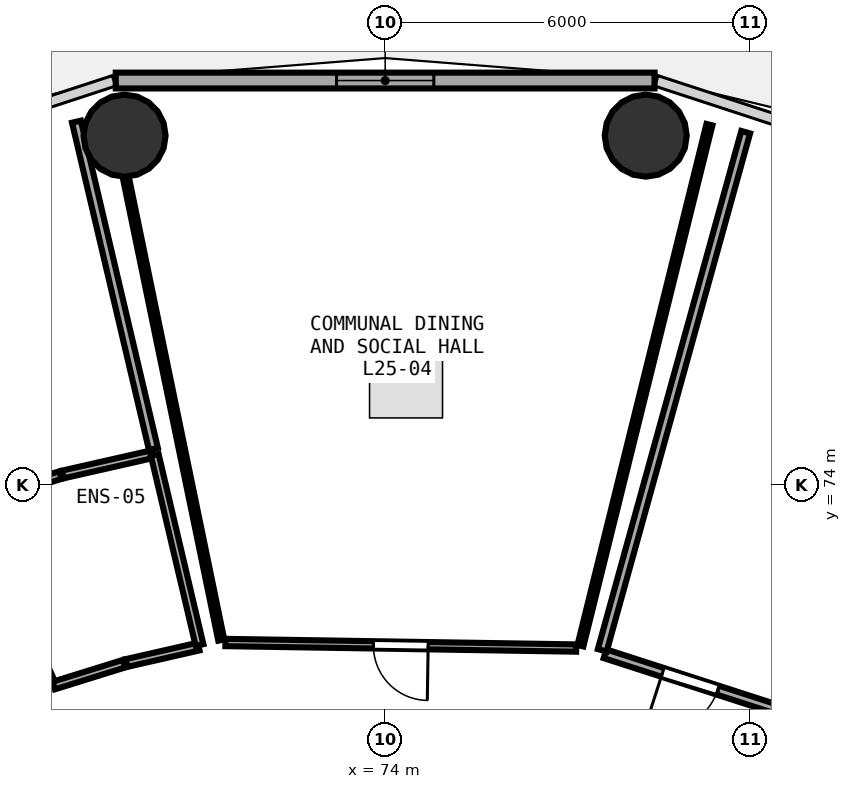
"""IFC4 building model, lengths in metres.
Left out: names, types, materials, properties, quantities, classifications, styles, units other than length and angle.
Written with IfcOpenShell. Run it as: python <this file> out.ifc"""

import sys

from ifc_helpers import new_model, si_unit, direction, frame, frame_2d, origin, origin_2d, place, context, subcontext, project, spatial, rectangle, circle, extrude, element, fill, save


model = new_model("IFC4")
c1 = context("Model", 3, precision=1e-05, world=origin(), true_north=direction((0.0, 1.0)))
c2 = subcontext(c1, "Body", "Model", "MODEL_VIEW")
j1 = project(units=[si_unit("LENGTHUNIT", "METRE"), si_unit("PLANEANGLEUNIT", "RADIAN")], contexts=[c1])
p1 = place(None, origin())
s1 = spatial("IfcSite", under=j1, at=p1, CompositionType="ELEMENT")
p2 = place(p1, origin())
s2 = spatial("IfcBuilding", under=s1, at=p2, CompositionType="ELEMENT")
p3 = place(p2, frame((0.0, 0.0, 98.85)))
s3 = spatial("IfcBuildingStorey", under=s2, at=p3, CompositionType="ELEMENT", Elevation=98.85)
for number, where, z_axis, x_axis in (
    (1, (78.286, 79.745, 0.0), (0.0, 0.0, 1.0), (1.0, 0.0, 0.0)),
    (2, (69.714, 79.745, 0.0), (0.0, 0.0, 1.0), (1.0, 0.0, 0.0)),
):
    element("IfcColumn", number, at=place(p3, frame(where, z_axis=z_axis, x_axis=x_axis)), inside=s3, PredefinedType="COLUMN", context=c2, shape_type="SweptSolid", body=[
        extrude(circle(Radius=0.675, at=origin_2d()), origin(), (0.0, 0.0, 1.0), 3.75),
    ])
p4 = place(p3, frame((78.43, 80.651, 0.0), z_axis=(0.0, 0.0, 1.0), x_axis=(-1.0, 0.0, 0.0)))
e3 = element("IfcWall", 3, at=p4, inside=s3, PredefinedType="SOLIDWALL", context=c2, shape_type="SweptSolid", body=[
    extrude(rectangle(XDim=8.861, YDim=0.26, at=frame_2d((4.43, 0.0))), origin(), (0.0, 0.0, 1.0), 3.475),
])
p5 = place(p4, frame((3.63, 0.0, 0.85)))
e4 = element("IfcOpeningElement", 4, at=p5, cuts=e3, PredefinedType="OPENING", context=c2, shape_type="SweptSolid", body=[
    extrude(rectangle(XDim=1.6, YDim=1.45, at=frame_2d((0.8, 0.725))), frame((0.0, 0.14, 0.0), z_axis=(0.0, -1.0, 0.0), x_axis=(1.0, 0.0, 0.0)), (0.0, 0.0, 1.0), 0.28),
])
p6 = place(p3, frame((80.415, 70.32, 0.0), z_axis=(0.0, 0.0, 1.0), x_axis=(-0.951622481895, 0.307269673009, 0.0)))
e5 = element("IfcWall", 5, at=p6, inside=s3, PredefinedType="PARTITIONING", context=c2, shape_type="SweptSolid", body=[
    extrude(rectangle(XDim=2.94, YDim=0.15, at=frame_2d((1.47, 0.0))), origin(), (0.0, 0.0, 1.0), 3.235),
])
p7 = place(p6, frame((0.995, 0.0, 0.0)))
e6 = element("IfcOpeningElement", 6, at=p7, cuts=e5, PredefinedType="OPENING", context=c2, shape_type="SweptSolid", body=[
    extrude(rectangle(XDim=0.95, YDim=2.08, at=frame_2d((0.475, 1.04))), frame((0.0, 0.085, 0.0), z_axis=(0.0, -1.0, 0.0), x_axis=(1.0, 0.0, 0.0)), (0.0, 0.0, 1.0), 0.17),
])
p8 = place(p3, frame((77.142, 71.318, 0.0), z_axis=(0.0, 0.0, 1.0), x_axis=(-0.999874771211, 0.015825356091, 0.0)))
e7 = element("IfcWall", 7, at=p8, inside=s3, PredefinedType="PARTITIONING", context=c2, shape_type="SweptSolid", body=[
    extrude(rectangle(XDim=5.77, YDim=0.12, at=frame_2d((2.885, 0.0))), origin(), (0.0, 0.0, 1.0), 3.48),
])
p9 = place(p8, frame((2.435, 0.0, 0.0)))
e8 = element("IfcOpeningElement", 8, at=p9, cuts=e7, PredefinedType="OPENING", context=c2, shape_type="SweptSolid", body=[
    extrude(rectangle(XDim=0.9, YDim=2.08, at=frame_2d((0.45, 1.04))), frame((0.0, 0.07, 0.0), z_axis=(0.0, -1.0, 0.0), x_axis=(1.0, 0.0, 0.0)), (0.0, 0.0, 1.0), 0.14),
])
p10 = place(p3, frame((68.506, 70.75, 0.0), z_axis=(0.0, 0.0, 1.0), x_axis=(-0.406231177337, 0.913770337973, 0.0)))
e9 = element("IfcWall", 9, at=p10, inside=s3, PredefinedType="PLUMBINGWALL", context=c2, shape_type="SweptSolid", body=[
    extrude(rectangle(XDim=3.176, YDim=0.13, at=frame_2d((1.588, 0.0))), origin(), (0.0, 0.0, 1.0), 3.175),
])
p11 = place(p10, frame((1.158, 0.0, 0.0)))
e10 = element("IfcOpeningElement", 10, at=p11, cuts=e9, PredefinedType="OPENING", context=c2, shape_type="SweptSolid", body=[
    extrude(rectangle(XDim=0.86, YDim=2.05, at=frame_2d((0.43, 1.025))), frame((0.0, 0.075, 0.0), z_axis=(0.0, -1.0, 0.0), x_axis=(1.0, 0.0, 0.0)), (0.0, 0.0, 1.0), 0.15),
])
p12 = place(p3, frame((77.571, 71.281, 0.0), z_axis=(0.0, 0.0, 1.0), x_axis=(0.266746506471, 0.963766725554, 0.0)))
e11 = element("IfcWall", 11, at=p12, inside=s3, PredefinedType="PARTITIONING", context=c2, shape_type="SweptSolid", body=[
    extrude(rectangle(XDim=8.841, YDim=0.15, at=frame_2d((4.421, 0.0))), origin(), (0.0, 0.0, 1.0), 2.925),
])
p13 = place(p3, frame((71.305, 71.449, 0.0), z_axis=(0.0, 0.0, 1.0), x_axis=(-0.202123638545, 0.979360012836, 0.0)))
e12 = element("IfcWall", 12, at=p13, inside=s3, PredefinedType="PARTITIONING", context=c2, shape_type="SweptSolid", body=[
    extrude(rectangle(XDim=7.756, YDim=0.1, at=frame_2d((3.878, 0.0))), origin(), (0.0, 0.0, 1.0), 2.925),
])
p14 = place(p3, frame((79.333, 79.925, 0.0), z_axis=(0.0, 0.0, 1.0), x_axis=(-0.240342194274, -0.970688224741, 0.0)))
e13 = element("IfcWall", 13, at=p14, inside=s3, PredefinedType="PARTITIONING", context=c2, shape_type="SweptSolid", body=[
    extrude(rectangle(XDim=8.828, YDim=0.1, at=frame_2d((4.414, 0.0))), origin(), (0.0, 0.0, 1.0), 2.925),
])
p15 = place(p3, frame((70.933, 71.343, 0.0), z_axis=(0.0, 0.0, 1.0), x_axis=(-0.974915720647, -0.222574341818, 0.0)))
e14 = element("IfcWall", 14, at=p15, inside=s3, PredefinedType="PLUMBINGWALL", context=c2, shape_type="SweptSolid", body=[
    extrude(rectangle(XDim=1.218, YDim=0.13, at=frame_2d((0.609, 0.0))), origin(), (0.0, 0.0, 1.0), 2.925),
])
p16 = place(p3, frame((69.707, 71.061, 0.0), z_axis=(0.0, 0.0, 1.0), x_axis=(-0.954873275734, -0.297013513646, 0.0)))
e15 = element("IfcWall", 15, at=p16, inside=s3, PredefinedType="PLUMBINGWALL", context=c2, shape_type="SweptSolid", body=[
    extrude(rectangle(XDim=1.212, YDim=0.13, at=frame_2d((0.606, 0.0))), origin(), (0.0, 0.0, 1.0), 3.48),
])
p17 = place(p3, frame((67.21, 73.713, 0.0), z_axis=(0.0, 0.0, 1.0), x_axis=(0.955249123401, 0.295802488566, 0.0)))
e16 = element("IfcWall", 16, at=p17, inside=s3, PredefinedType="PLUMBINGWALL", context=c2, shape_type="SweptSolid", body=[
    extrude(rectangle(XDim=1.519, YDim=0.13, at=frame_2d((0.759, 0.0))), origin(), (0.0, 0.0, 1.0), 3.48),
])
p18 = place(p3, frame((68.699, 74.172, 0.0), z_axis=(0.0, 0.0, 1.0), x_axis=(0.975247540647, 0.221115884688, 0.0)))
e17 = element("IfcWall", 17, at=p18, inside=s3, PredefinedType="PLUMBINGWALL", context=c2, shape_type="SweptSolid", body=[
    extrude(rectangle(XDim=1.525, YDim=0.13, at=frame_2d((0.762, 0.0))), origin(), (0.0, 0.0, 1.0), 2.925),
])
p19 = place(p3, frame((70.211, 74.494, 0.0), z_axis=(0.0, 0.0, 1.0), x_axis=(0.229284929256, -0.973359348451, 0.0)))
e18 = element("IfcWall", 18, at=p19, inside=s3, PredefinedType="PLUMBINGWALL", context=c2, shape_type="SweptSolid", body=[
    extrude(rectangle(XDim=3.214, YDim=0.13, at=frame_2d((1.607, 0.0))), origin(), (0.0, 0.0, 1.0), 2.925),
])
p20 = place(p3, frame((68.923, 79.974, 0.0), z_axis=(0.0, 0.0, 1.0), x_axis=(0.228901508724, -0.973449587449, 0.0)))
e19 = element("IfcWall", 19, at=p20, inside=s3, PredefinedType="PARTITIONING", context=c2, shape_type="SweptSolid", body=[
    extrude(rectangle(XDim=5.529, YDim=0.15, at=frame_2d((2.765, 0.0))), origin(), (0.0, 0.0, 1.0), 2.925),
])
p21 = place(p5, origin())
e20 = element("IfcWindow", 20, at=p21, inside=s3, PartitioningType="SINGLE_PANEL", PredefinedType="WINDOW", context=c2, shape_type="SweptSolid", body=[
    extrude(rectangle(XDim=1.6, YDim=1.45, at=frame_2d((0.8, 0.725))), frame((0.0, 0.03, 0.0), z_axis=(0.0, -1.0, 0.0), x_axis=(1.0, 0.0, 0.0)), (0.0, 0.0, 1.0), 0.06),
])
fill(e4, e20)
p22 = place(p7, origin())
e21 = element("IfcDoor", 21, at=p22, inside=s3, OperationType="SINGLE_SWING_RIGHT", PredefinedType="DOOR", context=c2, shape_type="SweptSolid", body=[
    extrude(rectangle(XDim=0.95, YDim=2.08, at=frame_2d((0.475, 1.04))), frame((0.0, 0.025, 0.0), z_axis=(0.0, -1.0, 0.0), x_axis=(1.0, 0.0, 0.0)), (0.0, 0.0, 1.0), 0.05),
])
fill(e6, e21)
p23 = place(p9, origin())
e22 = element("IfcDoor", 22, at=p23, inside=s3, OperationType="SINGLE_SWING_LEFT", PredefinedType="DOOR", context=c2, shape_type="SweptSolid", body=[
    extrude(rectangle(XDim=0.9, YDim=2.08, at=frame_2d((0.45, 1.04))), frame((0.0, 0.025, 0.0), z_axis=(0.0, -1.0, 0.0), x_axis=(1.0, 0.0, 0.0)), (0.0, 0.0, 1.0), 0.05),
])
fill(e8, e22)
save(model, sys.argv[1])
